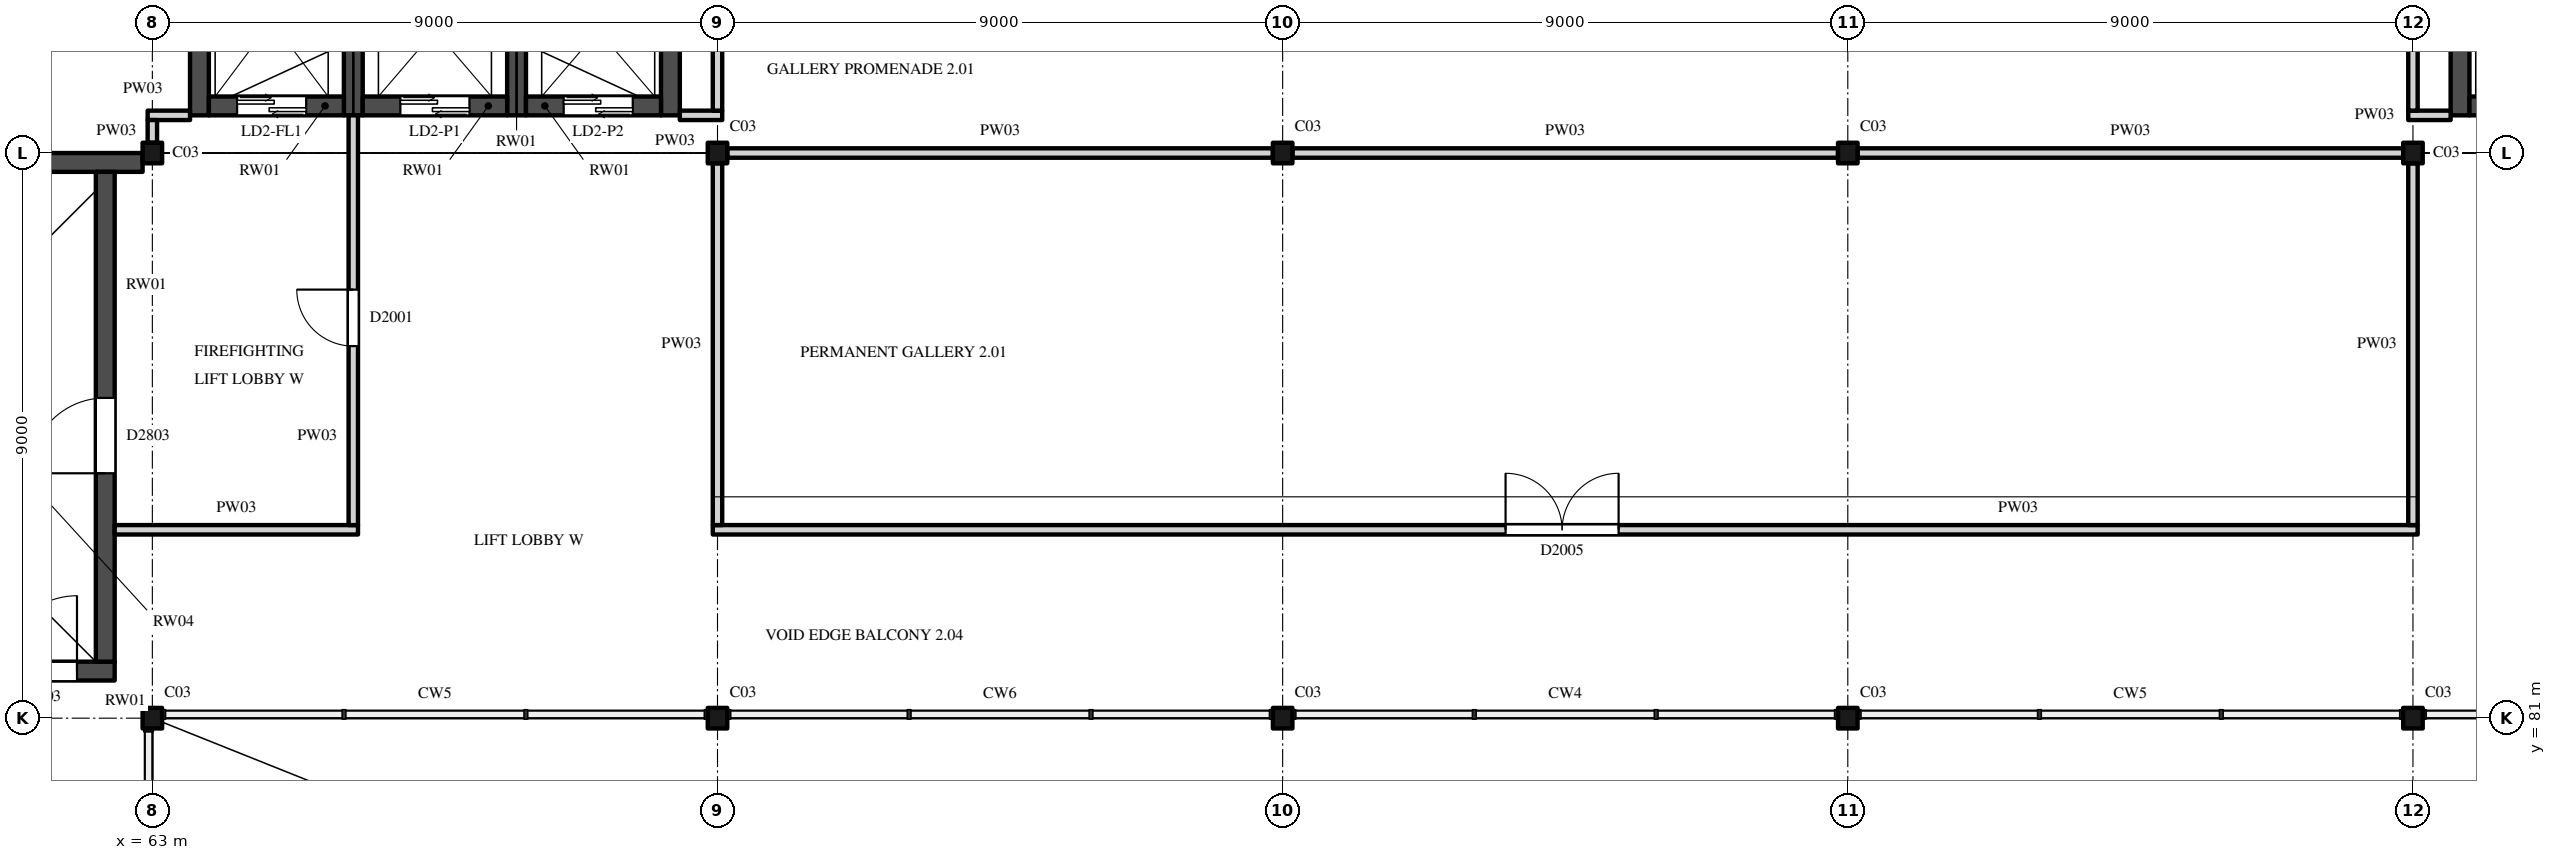
"""IFC4 building model, lengths in metres.
Left out: names, types, materials, properties, quantities, classifications, styles, units other than length and angle.
Written with IfcOpenShell. Run it as: python <this file> out.ifc"""

import sys

from ifc_helpers import new_model, si_unit, direction, frame, frame_2d, origin, origin_2d, place, context, subcontext, project, spatial, rectangle, i_section, extrude, element, fill, save


model = new_model("IFC4")
c1 = context("Model", 3, precision=1e-05, world=origin(), true_north=direction((0.0, 1.0)))
c2 = subcontext(c1, "Body", "Model", "MODEL_VIEW")
j1 = project(units=[si_unit("LENGTHUNIT", "METRE"), si_unit("PLANEANGLEUNIT", "RADIAN")], contexts=[c1])
p1 = place(None, origin())
s1 = spatial("IfcSite", under=j1, at=p1, CompositionType="ELEMENT")
p2 = place(p1, origin())
s2 = spatial("IfcBuilding", under=s1, at=p2, CompositionType="ELEMENT")
p3 = place(p2, frame((0.0, 0.0, 11.0)))
s3 = spatial("IfcBuildingStorey", under=s2, at=p3, CompositionType="ELEMENT", Elevation=11.0)
for number, where, z_axis, x_axis in (
    (1, (63.0, 81.0, 0.0), (0.0, 0.0, 1.0), (1.0, 0.0, 0.0)),
    (2, (72.0, 81.0, 0.0), (0.0, 0.0, 1.0), (1.0, 0.0, 0.0)),
    (3, (81.0, 81.0, 0.0), (0.0, 0.0, 1.0), (1.0, 0.0, 0.0)),
    (4, (90.0, 81.0, 0.0), (0.0, 0.0, 1.0), (1.0, 0.0, 0.0)),
    (5, (99.0, 81.0, 0.0), (0.0, 0.0, 1.0), (1.0, 0.0, 0.0)),
    (6, (63.0, 90.0, 0.0), (0.0, 0.0, 1.0), (1.0, 0.0, 0.0)),
    (7, (72.0, 90.0, 0.0), (0.0, 0.0, 1.0), (1.0, 0.0, 0.0)),
    (8, (81.0, 90.0, 0.0), (0.0, 0.0, 1.0), (1.0, 0.0, 0.0)),
    (9, (90.0, 90.0, 0.0), (0.0, 0.0, 1.0), (1.0, 0.0, 0.0)),
    (10, (99.0, 90.0, 0.0), (0.0, 0.0, 1.0), (1.0, 0.0, 0.0)),
):
    element("IfcColumn", number, at=place(p3, frame(where, z_axis=z_axis, x_axis=x_axis)), inside=s3, PredefinedType="COLUMN", context=c2, shape_type="SweptSolid", body=[
        extrude(i_section(OverallWidth=0.311, OverallDepth=0.327, WebThickness=0.016, FlangeThickness=0.025, FilletRadius=0.017, at=origin_2d()), origin(), (0.0, 0.0, 1.0), 5.0),
    ])
p4 = place(p3, frame((54.3, 81.75, 0.0), z_axis=(0.0, 0.0, 1.0), x_axis=(1.0, 0.0, 0.0)))
e11 = element("IfcWall", 11, at=p4, inside=s3, PredefinedType="SHEAR", context=c2, shape_type="SweptSolid", body=[
    extrude(rectangle(XDim=8.1, YDim=0.3, at=frame_2d((4.05, 0.0))), origin(), (0.0, 0.0, 1.0), 5.0),
])
p5 = place(p4, frame((6.3, 0.0, 0.0)))
e12 = element("IfcOpeningElement", 12, at=p5, cuts=e11, PredefinedType="OPENING", context=c2, shape_type="SweptSolid", body=[
    extrude(rectangle(XDim=1.2, YDim=2.1, at=frame_2d((0.6, 1.05))), frame((0.0, 0.16, 0.0), z_axis=(0.0, -1.0, 0.0), x_axis=(1.0, 0.0, 0.0)), (0.0, 0.0, 1.0), 0.32),
])
p6 = place(p3, frame((54.3, 89.85, 0.0), z_axis=(0.0, 0.0, 1.0), x_axis=(1.0, 0.0, 0.0)))
e13 = element("IfcWall", 13, at=p6, inside=s3, PredefinedType="SHEAR", context=c2, shape_type="SweptSolid", body=[
    extrude(rectangle(XDim=8.544, YDim=0.3, at=frame_2d((4.272, 0.0))), origin(), (0.0, 0.0, 1.0), 5.0),
])
p7 = place(p3, frame((62.25, 81.9, 0.0), z_axis=(0.0, 0.0, 1.0), x_axis=(0.0, 1.0, 0.0)))
e14 = element("IfcWall", 14, at=p7, inside=s3, PredefinedType="SHEAR", context=c2, shape_type="SweptSolid", body=[
    extrude(rectangle(XDim=7.8, YDim=0.3, at=frame_2d((3.9, 0.0))), origin(), (0.0, 0.0, 1.0), 5.0),
])
p8 = place(p7, frame((3.0, 0.0, 0.0)))
e15 = element("IfcOpeningElement", 15, at=p8, cuts=e14, PredefinedType="OPENING", context=c2, shape_type="SweptSolid", body=[
    extrude(rectangle(XDim=1.2, YDim=2.1, at=frame_2d((0.6, 1.05))), frame((0.0, 0.16, 0.0), z_axis=(0.0, -1.0, 0.0), x_axis=(1.0, 0.0, 0.0)), (0.0, 0.0, 1.0), 0.32),
])
for number, where, z_axis, x_axis in (
    (16, (63.75, 90.6, 0.0), (0.0, 0.0, 1.0), (0.0, 1.0, 0.0)),
    (17, (66.2, 90.6, 0.0), (0.0, 0.0, 1.0), (0.0, 1.0, 0.0)),
    (18, (68.8, 90.6, 0.0), (0.0, 0.0, 1.0), (0.0, 1.0, 0.0)),
    (19, (71.25, 90.6, 0.0), (0.0, 0.0, 1.0), (0.0, 1.0, 0.0)),
):
    element("IfcWall", number, at=place(p3, frame(where, z_axis=z_axis, x_axis=x_axis)), inside=s3, PredefinedType="SHEAR", context=c2, shape_type="SweptSolid", body=[
        extrude(rectangle(XDim=3.6, YDim=0.3, at=frame_2d((1.8, 0.0))), origin(), (0.0, 0.0, 1.0), 5.0),
    ])
p9 = place(p3, frame((63.9, 90.75, 0.0), z_axis=(0.0, 0.0, 1.0), x_axis=(1.0, 0.0, 0.0)))
e20 = element("IfcWall", 20, at=p9, inside=s3, PredefinedType="SHEAR", context=c2, shape_type="SweptSolid", body=[
    extrude(rectangle(XDim=2.15, YDim=0.3, at=frame_2d((1.075, 0.0))), origin(), (0.0, 0.0, 1.0), 5.0),
])
p10 = place(p9, frame((0.45, 0.0, 0.0)))
e21 = element("IfcOpeningElement", 21, at=p10, cuts=e20, PredefinedType="OPENING", context=c2, shape_type="SweptSolid", body=[
    extrude(rectangle(XDim=1.1, YDim=2.1, at=frame_2d((0.55, 1.05))), frame((0.0, 0.16, 0.0), z_axis=(0.0, -1.0, 0.0), x_axis=(1.0, 0.0, 0.0)), (0.0, 0.0, 1.0), 0.32),
])
p11 = place(p3, frame((66.35, 90.75, 0.0), z_axis=(0.0, 0.0, 1.0), x_axis=(1.0, 0.0, 0.0)))
e22 = element("IfcWall", 22, at=p11, inside=s3, PredefinedType="SHEAR", context=c2, shape_type="SweptSolid", body=[
    extrude(rectangle(XDim=2.3, YDim=0.3, at=frame_2d((1.15, 0.0))), origin(), (0.0, 0.0, 1.0), 5.0),
])
p12 = place(p11, frame((0.6, 0.0, 0.0)))
e23 = element("IfcOpeningElement", 23, at=p12, cuts=e22, PredefinedType="OPENING", context=c2, shape_type="SweptSolid", body=[
    extrude(rectangle(XDim=1.1, YDim=2.1, at=frame_2d((0.55, 1.05))), frame((0.0, 0.16, 0.0), z_axis=(0.0, -1.0, 0.0), x_axis=(1.0, 0.0, 0.0)), (0.0, 0.0, 1.0), 0.32),
])
p13 = place(p3, frame((68.95, 90.75, 0.0), z_axis=(0.0, 0.0, 1.0), x_axis=(1.0, 0.0, 0.0)))
e24 = element("IfcWall", 24, at=p13, inside=s3, PredefinedType="SHEAR", context=c2, shape_type="SweptSolid", body=[
    extrude(rectangle(XDim=2.15, YDim=0.3, at=frame_2d((1.075, 0.0))), origin(), (0.0, 0.0, 1.0), 5.0),
])
p14 = place(p13, frame((0.6, 0.0, 0.0)))
e25 = element("IfcOpeningElement", 25, at=p14, cuts=e24, PredefinedType="OPENING", context=c2, shape_type="SweptSolid", body=[
    extrude(rectangle(XDim=1.1, YDim=2.1, at=frame_2d((0.55, 1.05))), frame((0.0, 0.16, 0.0), z_axis=(0.0, -1.0, 0.0), x_axis=(1.0, 0.0, 0.0)), (0.0, 0.0, 1.0), 0.32),
])
p15 = place(p3, frame((99.75, 90.6, 0.0), z_axis=(0.0, 0.0, 1.0), x_axis=(0.0, 1.0, 0.0)))
e26 = element("IfcWall", 26, at=p15, inside=s3, PredefinedType="SHEAR", context=c2, shape_type="SweptSolid", body=[
    extrude(rectangle(XDim=3.6, YDim=0.3, at=frame_2d((1.8, 0.0))), origin(), (0.0, 0.0, 1.0), 5.0),
])
p16 = place(p3, frame((99.9, 90.75, 0.0), z_axis=(0.0, 0.0, 1.0), x_axis=(1.0, 0.0, 0.0)))
e27 = element("IfcWall", 27, at=p16, inside=s3, PredefinedType="SHEAR", context=c2, shape_type="SweptSolid", body=[
    extrude(rectangle(XDim=2.15, YDim=0.3, at=frame_2d((1.075, 0.0))), origin(), (0.0, 0.0, 1.0), 5.0),
])
p17 = place(p16, frame((0.45, 0.0, 0.0)))
e28 = element("IfcOpeningElement", 28, at=p17, cuts=e27, PredefinedType="OPENING", context=c2, shape_type="SweptSolid", body=[
    extrude(rectangle(XDim=1.1, YDim=2.1, at=frame_2d((0.55, 1.05))), frame((0.0, 0.16, 0.0), z_axis=(0.0, -1.0, 0.0), x_axis=(1.0, 0.0, 0.0)), (0.0, 0.0, 1.0), 0.32),
])
p18 = place(p3, frame((62.4, 84.0, 0.0), z_axis=(0.0, 0.0, 1.0), x_axis=(1.0, 0.0, 0.0)))
e29 = element("IfcWall", 29, at=p18, inside=s3, PredefinedType="PARTITIONING", context=c2, shape_type="SweptSolid", body=[
    extrude(rectangle(XDim=3.875, YDim=0.15, at=frame_2d((1.938, 0.0))), origin(), (0.0, 0.0, 1.0), 4.469),
])
p19 = place(p3, frame((71.925, 84.0, 0.0), z_axis=(0.0, 0.0, 1.0), x_axis=(1.0, 0.0, 0.0)))
e30 = element("IfcWall", 30, at=p19, inside=s3, PredefinedType="PARTITIONING", context=c2, shape_type="SweptSolid", body=[
    extrude(rectangle(XDim=27.15, YDim=0.15, at=frame_2d((13.575, 0.0))), origin(), (0.0, 0.0, 1.0), 4.469),
])
p20 = place(p19, frame((12.625, 0.0, 0.0)))
e31 = element("IfcOpeningElement", 31, at=p20, cuts=e30, PredefinedType="OPENING", context=c2, shape_type="SweptSolid", body=[
    extrude(rectangle(XDim=1.8, YDim=2.4, at=frame_2d((0.9, 1.2))), frame((0.0, 0.085, 0.0), z_axis=(0.0, -1.0, 0.0), x_axis=(1.0, 0.0, 0.0)), (0.0, 0.0, 1.0), 0.17),
])
for number, where, z_axis, x_axis in (
    (32, (72.156, 90.0, 0.0), (0.0, 0.0, 1.0), (1.0, 0.0, 0.0)),
    (33, (81.156, 90.0, 0.0), (0.0, 0.0, 1.0), (1.0, 0.0, 0.0)),
    (34, (90.156, 90.0, 0.0), (0.0, 0.0, 1.0), (1.0, 0.0, 0.0)),
):
    element("IfcWall", number, at=place(p3, frame(where, z_axis=z_axis, x_axis=x_axis)), inside=s3, PredefinedType="PARTITIONING", context=c2, shape_type="SweptSolid", body=[
        extrude(rectangle(XDim=8.689, YDim=0.15, at=frame_2d((4.344, 0.0))), origin(), (0.0, 0.0, 1.0), 4.469),
    ])
for number, where, z_axis, x_axis in (
    (35, (62.925, 90.6, 0.0), (0.0, 0.0, 1.0), (1.0, 0.0, 0.0)),
    (36, (71.4, 90.6, 0.0), (0.0, 0.0, 1.0), (1.0, 0.0, 0.0)),
    (37, (98.925, 90.6, 0.0), (0.0, 0.0, 1.0), (1.0, 0.0, 0.0)),
):
    element("IfcWall", number, at=place(p3, frame(where, z_axis=z_axis, x_axis=x_axis)), inside=s3, PredefinedType="PARTITIONING", context=c2, shape_type="SweptSolid", body=[
        extrude(rectangle(XDim=0.675, YDim=0.15, at=frame_2d((0.337, 0.0))), origin(), (0.0, 0.0, 1.0), 4.825),
    ])
p21 = place(p3, frame((63.0, 90.164, 0.0), z_axis=(0.0, 0.0, 1.0), x_axis=(0.0, 1.0, 0.0)))
e38 = element("IfcWall", 38, at=p21, inside=s3, PredefinedType="PARTITIONING", context=c2, shape_type="SweptSolid", body=[
    extrude(rectangle(XDim=0.361, YDim=0.15, at=frame_2d((0.181, 0.0))), origin(), (0.0, 0.0, 1.0), 4.825),
])
p22 = place(p3, frame((66.2, 84.075, 0.0), z_axis=(0.0, 0.0, 1.0), x_axis=(0.0, 1.0, 0.0)))
e39 = element("IfcWall", 39, at=p22, inside=s3, PredefinedType="PARTITIONING", context=c2, shape_type="SweptSolid", body=[
    extrude(rectangle(XDim=6.525, YDim=0.15, at=frame_2d((3.263, 0.0))), origin(), (0.0, 0.0, 1.0), 4.825),
])
p23 = place(p22, frame((2.85, 0.0, 0.0)))
e40 = element("IfcOpeningElement", 40, at=p23, cuts=e39, PredefinedType="OPENING", context=c2, shape_type="SweptSolid", body=[
    extrude(rectangle(XDim=0.9, YDim=2.1, at=frame_2d((0.45, 1.05))), frame((0.0, 0.085, 0.0), z_axis=(0.0, -1.0, 0.0), x_axis=(1.0, 0.0, 0.0)), (0.0, 0.0, 1.0), 0.17),
])
p24 = place(p3, frame((72.0, 84.075, 0.0), z_axis=(0.0, 0.0, 1.0), x_axis=(0.0, 1.0, 0.0)))
e41 = element("IfcWall", 41, at=p24, inside=s3, PredefinedType="PARTITIONING", context=c2, shape_type="SweptSolid", body=[
    extrude(rectangle(XDim=5.761, YDim=0.15, at=frame_2d((2.881, 0.0))), origin(), (0.0, 0.0, 1.0), 4.371),
])
p25 = place(p3, frame((72.0, 90.675, 0.0), z_axis=(0.0, 0.0, 1.0), x_axis=(0.0, 1.0, 0.0)))
e42 = element("IfcWall", 42, at=p25, inside=s3, PredefinedType="PARTITIONING", context=c2, shape_type="SweptSolid", body=[
    extrude(rectangle(XDim=8.168, YDim=0.15, at=frame_2d((4.084, 0.0))), origin(), (0.0, 0.0, 1.0), 4.371),
])
p26 = place(p3, frame((99.0, 84.075, 0.0), z_axis=(0.0, 0.0, 1.0), x_axis=(0.0, 1.0, 0.0)))
e43 = element("IfcWall", 43, at=p26, inside=s3, PredefinedType="PARTITIONING", context=c2, shape_type="SweptSolid", body=[
    extrude(rectangle(XDim=5.761, YDim=0.15, at=frame_2d((2.881, 0.0))), origin(), (0.0, 0.0, 1.0), 4.371),
])
p27 = place(p3, frame((99.0, 90.675, 0.0), z_axis=(0.0, 0.0, 1.0), x_axis=(0.0, 1.0, 0.0)))
e44 = element("IfcWall", 44, at=p27, inside=s3, PredefinedType="PARTITIONING", context=c2, shape_type="SweptSolid", body=[
    extrude(rectangle(XDim=8.168, YDim=0.15, at=frame_2d((4.084, 0.0))), origin(), (0.0, 0.0, 1.0), 4.371),
])
p28 = place(p8, origin())
e45 = element("IfcDoor", 45, at=p28, inside=s3, OperationType="SINGLE_SWING_RIGHT", PredefinedType="DOOR", context=c2, shape_type="SweptSolid", body=[
    extrude(rectangle(XDim=1.2, YDim=2.1, at=frame_2d((0.6, 1.05))), frame((0.0, 0.025, 0.0), z_axis=(0.0, -1.0, 0.0), x_axis=(1.0, 0.0, 0.0)), (0.0, 0.0, 1.0), 0.05),
])
fill(e15, e45)
p29 = place(p5, origin())
e46 = element("IfcDoor", 46, at=p29, inside=s3, OperationType="SINGLE_SWING_LEFT", PredefinedType="DOOR", context=c2, shape_type="SweptSolid", body=[
    extrude(rectangle(XDim=1.2, YDim=2.1, at=frame_2d((0.6, 1.05))), frame((0.0, 0.025, 0.0), z_axis=(0.0, -1.0, 0.0), x_axis=(1.0, 0.0, 0.0)), (0.0, 0.0, 1.0), 0.05),
])
fill(e12, e46)
p30 = place(p10, origin())
e47 = element("IfcDoor", 47, at=p30, inside=s3, OperationType="DOUBLE_DOOR_SLIDING", PredefinedType="DOOR", context=c2, shape_type="SweptSolid", body=[
    extrude(rectangle(XDim=1.1, YDim=2.1, at=frame_2d((0.55, 1.05))), frame((0.0, 0.025, 0.0), z_axis=(0.0, -1.0, 0.0), x_axis=(1.0, 0.0, 0.0)), (0.0, 0.0, 1.0), 0.05),
])
fill(e21, e47)
p31 = place(p12, origin())
e48 = element("IfcDoor", 48, at=p31, inside=s3, OperationType="DOUBLE_DOOR_SLIDING", PredefinedType="DOOR", context=c2, shape_type="SweptSolid", body=[
    extrude(rectangle(XDim=1.1, YDim=2.1, at=frame_2d((0.55, 1.05))), frame((0.0, 0.025, 0.0), z_axis=(0.0, -1.0, 0.0), x_axis=(1.0, 0.0, 0.0)), (0.0, 0.0, 1.0), 0.05),
])
fill(e23, e48)
p32 = place(p14, origin())
e49 = element("IfcDoor", 49, at=p32, inside=s3, OperationType="DOUBLE_DOOR_SLIDING", PredefinedType="DOOR", context=c2, shape_type="SweptSolid", body=[
    extrude(rectangle(XDim=1.1, YDim=2.1, at=frame_2d((0.55, 1.05))), frame((0.0, 0.025, 0.0), z_axis=(0.0, -1.0, 0.0), x_axis=(1.0, 0.0, 0.0)), (0.0, 0.0, 1.0), 0.05),
])
fill(e25, e49)
p33 = place(p23, origin())
e50 = element("IfcDoor", 50, at=p33, inside=s3, OperationType="SINGLE_SWING_LEFT", PredefinedType="DOOR", context=c2, shape_type="SweptSolid", body=[
    extrude(rectangle(XDim=0.9, YDim=2.1, at=frame_2d((0.45, 1.05))), frame((0.0, 0.025, 0.0), z_axis=(0.0, -1.0, 0.0), x_axis=(1.0, 0.0, 0.0)), (0.0, 0.0, 1.0), 0.05),
])
fill(e40, e50)
p34 = place(p20, origin())
e51 = element("IfcDoor", 51, at=p34, inside=s3, OperationType="DOUBLE_DOOR_SINGLE_SWING", PredefinedType="DOOR", context=c2, shape_type="SweptSolid", body=[
    extrude(rectangle(XDim=1.8, YDim=2.4, at=frame_2d((0.9, 1.2))), frame((0.0, 0.025, 0.0), z_axis=(0.0, -1.0, 0.0), x_axis=(1.0, 0.0, 0.0)), (0.0, 0.0, 1.0), 0.05),
])
fill(e31, e51)
save(model, sys.argv[1])
